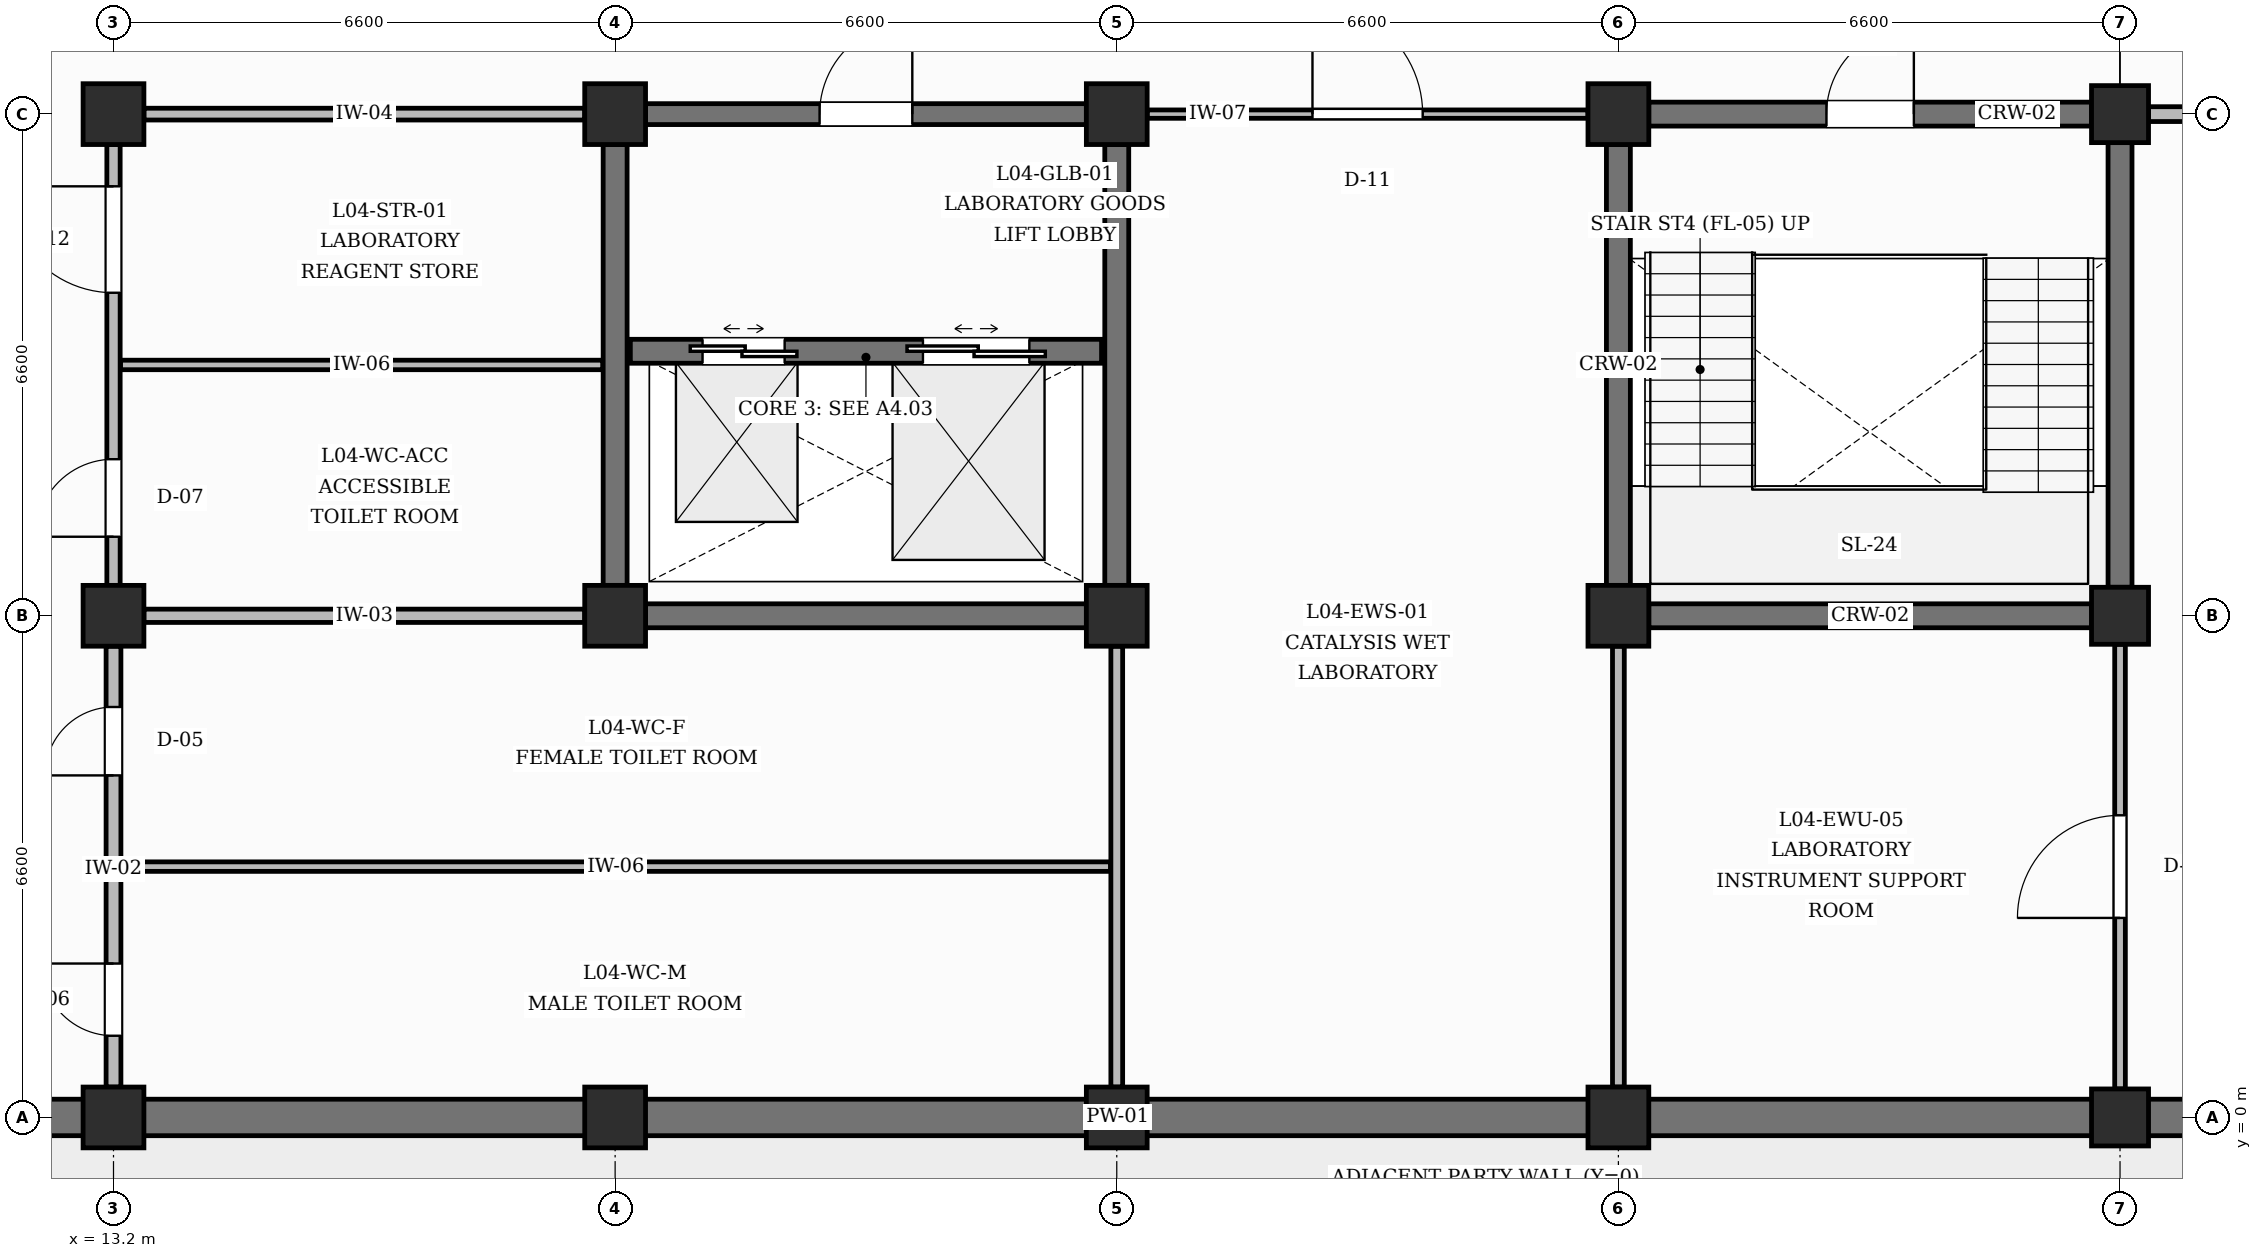
"""IFC4 building model, lengths in metres.
Left out: names, types, materials, properties, quantities, classifications, styles, units other than length and angle.
Written with IfcOpenShell. Run it as: python <this file> out.ifc"""

import sys

from ifc_helpers import new_model, si_unit, direction, frame, frame_2d, origin, origin_2d, place, context, subcontext, project, spatial, rectangle, extrude, element, fill, save


model = new_model("IFC4")
c1 = context("Model", 3, precision=1e-05, world=origin(), true_north=direction((0.0, 1.0)))
c2 = subcontext(c1, "Body", "Model", "MODEL_VIEW")
j1 = project(units=[si_unit("LENGTHUNIT", "METRE"), si_unit("PLANEANGLEUNIT", "RADIAN")], contexts=[c1])
p1 = place(None, origin())
s1 = spatial("IfcSite", under=j1, at=p1, CompositionType="ELEMENT")
p2 = place(p1, origin())
s2 = spatial("IfcBuilding", under=s1, at=p2, CompositionType="ELEMENT")
p3 = place(p2, frame((0.0, 0.0, 18.6)))
s3 = spatial("IfcBuildingStorey", under=s2, at=p3, CompositionType="ELEMENT", Elevation=18.6)
for number, where, z_axis, x_axis in (
    (1, (13.2, 0.0, 0.0), (0.0, 0.0, 1.0), (1.0, 0.0, 0.0)),
    (2, (13.2, 6.6, 0.0), (0.0, 0.0, 1.0), (1.0, 0.0, 0.0)),
    (3, (13.2, 13.2, 0.0), (0.0, 0.0, 1.0), (1.0, 0.0, 0.0)),
    (4, (19.8, 0.0, 0.0), (0.0, 0.0, 1.0), (1.0, 0.0, 0.0)),
    (5, (19.8, 6.6, 0.0), (0.0, 0.0, 1.0), (1.0, 0.0, 0.0)),
    (6, (19.8, 13.2, 0.0), (0.0, 0.0, 1.0), (1.0, 0.0, 0.0)),
    (7, (26.4, 0.0, 0.0), (0.0, 0.0, 1.0), (1.0, 0.0, 0.0)),
    (8, (26.4, 6.6, 0.0), (0.0, 0.0, 1.0), (1.0, 0.0, 0.0)),
    (9, (26.4, 13.2, 0.0), (0.0, 0.0, 1.0), (1.0, 0.0, 0.0)),
    (10, (33.0, 0.0, 0.0), (0.0, 0.0, 1.0), (1.0, 0.0, 0.0)),
    (11, (33.0, 6.6, 0.0), (0.0, 0.0, 1.0), (1.0, 0.0, 0.0)),
    (12, (33.0, 13.2, 0.0), (0.0, 0.0, 1.0), (1.0, 0.0, 0.0)),
):
    element("IfcColumn", number, at=place(p3, frame(where, z_axis=z_axis, x_axis=x_axis)), inside=s3, PredefinedType="COLUMN", context=c2, shape_type="SweptSolid", body=[
        extrude(rectangle(XDim=0.8, YDim=0.8, at=origin_2d()), origin(), (0.0, 0.0, 1.0), 4.2),
    ])
for number, where, z_axis, x_axis in (
    (13, (39.6, 0.0, 0.0), (0.0, 0.0, 1.0), (1.0, 0.0, 0.0)),
    (14, (39.6, 6.6, 0.0), (0.0, 0.0, 1.0), (1.0, 0.0, 0.0)),
    (15, (39.6, 13.2, 0.0), (0.0, 0.0, 1.0), (1.0, 0.0, 0.0)),
):
    element("IfcColumn", number, at=place(p3, frame(where, z_axis=z_axis, x_axis=x_axis)), inside=s3, PredefinedType="COLUMN", context=c2, shape_type="SweptSolid", body=[
        extrude(rectangle(XDim=0.75, YDim=0.75, at=origin_2d()), origin(), (0.0, 0.0, 1.0), 4.2),
    ])
p4 = place(p3, frame((7.0, 0.0, 0.0), z_axis=(0.0, 0.0, 1.0), x_axis=(1.0, 0.0, 0.0)))
e16 = element("IfcWall", 16, at=p4, inside=s3, PredefinedType="SOLIDWALL", context=c2, shape_type="SweptSolid", body=[
    extrude(rectangle(XDim=5.8, YDim=0.48, at=frame_2d((2.9, 0.0))), origin(), (0.0, 0.0, 1.0), 3.26),
])
p5 = place(p3, frame((13.6, 0.0, 0.0), z_axis=(0.0, 0.0, 1.0), x_axis=(1.0, 0.0, 0.0)))
e17 = element("IfcWall", 17, at=p5, inside=s3, PredefinedType="SOLIDWALL", context=c2, shape_type="SweptSolid", body=[
    extrude(rectangle(XDim=5.8, YDim=0.48, at=frame_2d((2.9, 0.0))), origin(), (0.0, 0.0, 1.0), 3.26),
])
for number, where, z_axis, x_axis in (
    (18, (20.2, 0.0, 0.0), (0.0, 0.0, 1.0), (1.0, 0.0, 0.0)),
    (19, (26.8, 0.0, 0.0), (0.0, 0.0, 1.0), (1.0, 0.0, 0.0)),
):
    element("IfcWall", number, at=place(p3, frame(where, z_axis=z_axis, x_axis=x_axis)), inside=s3, PredefinedType="SOLIDWALL", context=c2, shape_type="SweptSolid", body=[
        extrude(rectangle(XDim=5.8, YDim=0.48, at=frame_2d((2.9, 0.0))), origin(), (0.0, 0.0, 1.0), 3.26),
    ])
p6 = place(p3, frame((33.4, 0.0, 0.0), z_axis=(0.0, 0.0, 1.0), x_axis=(1.0, 0.0, 0.0)))
e20 = element("IfcWall", 20, at=p6, inside=s3, PredefinedType="SOLIDWALL", context=c2, shape_type="SweptSolid", body=[
    extrude(rectangle(XDim=5.825, YDim=0.48, at=frame_2d((2.913, 0.0))), origin(), (0.0, 0.0, 1.0), 3.26),
])
p7 = place(p3, frame((39.975, 0.0, 0.0), z_axis=(0.0, 0.0, 1.0), x_axis=(1.0, 0.0, 0.0)))
e21 = element("IfcWall", 21, at=p7, inside=s3, PredefinedType="SOLIDWALL", context=c2, shape_type="SweptSolid", body=[
    extrude(rectangle(XDim=5.85, YDim=0.48, at=frame_2d((2.925, 0.0))), origin(), (0.0, 0.0, 1.0), 3.26),
])
p8 = place(p3, frame((33.4, 6.6, 0.0), z_axis=(0.0, 0.0, 1.0), x_axis=(1.0, 0.0, 0.0)))
e22 = element("IfcWall", 22, at=p8, inside=s3, PredefinedType="SHEAR", context=c2, shape_type="SweptSolid", body=[
    extrude(rectangle(XDim=5.825, YDim=0.315, at=frame_2d((2.913, 0.0))), origin(), (0.0, 0.0, 1.0), 3.16),
])
p9 = place(p3, frame((33.4, 13.2, 0.0), z_axis=(0.0, 0.0, 1.0), x_axis=(1.0, 0.0, 0.0)))
e23 = element("IfcWall", 23, at=p9, inside=s3, PredefinedType="SHEAR", context=c2, shape_type="SweptSolid", body=[
    extrude(rectangle(XDim=5.825, YDim=0.315, at=frame_2d((2.913, 0.0))), origin(), (0.0, 0.0, 1.0), 3.16),
])
p10 = place(p9, frame((2.337, 0.0, 0.0)))
e24 = element("IfcOpeningElement", 24, at=p10, cuts=e23, PredefinedType="OPENING", context=c2, shape_type="SweptSolid", body=[
    extrude(rectangle(XDim=1.15, YDim=2.2, at=frame_2d((0.575, 1.1))), frame((0.0, 0.167, 0.0), z_axis=(0.0, -1.0, 0.0), x_axis=(1.0, 0.0, 0.0)), (0.0, 0.0, 1.0), 0.335),
])
p11 = place(p3, frame((33.0, 7.0, 0.0), z_axis=(0.0, 0.0, 1.0), x_axis=(0.0, 1.0, 0.0)))
e25 = element("IfcWall", 25, at=p11, inside=s3, PredefinedType="SHEAR", context=c2, shape_type="SweptSolid", body=[
    extrude(rectangle(XDim=5.8, YDim=0.315, at=frame_2d((2.9, 0.0))), origin(), (0.0, 0.0, 1.0), 3.16),
])
p12 = place(p3, frame((39.6, 6.975, 0.0), z_axis=(0.0, 0.0, 1.0), x_axis=(0.0, 1.0, 0.0)))
e26 = element("IfcWall", 26, at=p12, inside=s3, PredefinedType="SHEAR", context=c2, shape_type="SweptSolid", body=[
    extrude(rectangle(XDim=5.85, YDim=0.315, at=frame_2d((2.925, 0.0))), origin(), (0.0, 0.0, 1.0), 3.16),
])
for number, where, z_axis, x_axis in (
    (27, (20.2, 6.6, 0.0), (0.0, 0.0, 1.0), (1.0, 0.0, 0.0)),
    (28, (19.8, 7.0, 0.0), (0.0, 0.0, 1.0), (0.0, 1.0, 0.0)),
    (29, (26.4, 7.0, 0.0), (0.0, 0.0, 1.0), (0.0, 1.0, 0.0)),
):
    element("IfcWall", number, at=place(p3, frame(where, z_axis=z_axis, x_axis=x_axis)), inside=s3, PredefinedType="SHEAR", context=c2, shape_type="SweptSolid", body=[
        extrude(rectangle(XDim=5.8, YDim=0.315, at=frame_2d((2.9, 0.0))), origin(), (0.0, 0.0, 1.0), 3.16),
    ])
p13 = place(p3, frame((20.2, 13.2, 0.0), z_axis=(0.0, 0.0, 1.0), x_axis=(1.0, 0.0, 0.0)))
e30 = element("IfcWall", 30, at=p13, inside=s3, PredefinedType="SHEAR", context=c2, shape_type="SweptSolid", body=[
    extrude(rectangle(XDim=5.8, YDim=0.275, at=frame_2d((2.9, 0.0))), origin(), (0.0, 0.0, 1.0), 3.16),
])
p14 = place(p13, frame((2.29, 0.0, 0.0)))
e31 = element("IfcOpeningElement", 31, at=p14, cuts=e30, PredefinedType="OPENING", context=c2, shape_type="SweptSolid", body=[
    extrude(rectangle(XDim=1.22, YDim=2.15, at=frame_2d((0.61, 1.075))), frame((0.0, 0.147, 0.0), z_axis=(0.0, -1.0, 0.0), x_axis=(1.0, 0.0, 0.0)), (0.0, 0.0, 1.0), 0.295),
])
p15 = place(p3, frame((20.0, 10.08, 0.0), z_axis=(0.0, 0.0, 1.0), x_axis=(1.0, 0.0, 0.0)))
e32 = element("IfcWall", 32, at=p15, inside=s3, PredefinedType="SHEAR", context=c2, shape_type="SweptSolid", body=[
    extrude(rectangle(XDim=6.2, YDim=0.315, at=frame_2d((3.1, 0.0))), origin(), (0.0, 0.0, 1.0), 3.86),
])
p16 = place(p15, frame((0.95, 0.0, 0.0)))
e33 = element("IfcOpeningElement", 33, at=p16, cuts=e32, PredefinedType="OPENING", context=c2, shape_type="SweptSolid", body=[
    extrude(rectangle(XDim=1.08, YDim=2.15, at=frame_2d((0.54, 1.075))), frame((0.0, 0.167, 0.0), z_axis=(0.0, -1.0, 0.0), x_axis=(1.0, 0.0, 0.0)), (0.0, 0.0, 1.0), 0.335),
])
p17 = place(p15, frame((3.85, 0.0, 0.0)))
e34 = element("IfcOpeningElement", 34, at=p17, cuts=e32, PredefinedType="OPENING", context=c2, shape_type="SweptSolid", body=[
    extrude(rectangle(XDim=1.4, YDim=2.35, at=frame_2d((0.7, 1.175))), frame((0.0, 0.167, 0.0), z_axis=(0.0, -1.0, 0.0), x_axis=(1.0, 0.0, 0.0)), (0.0, 0.0, 1.0), 0.335),
])
p18 = place(p3, frame((13.2, 0.4, 0.0), z_axis=(0.0, 0.0, 1.0), x_axis=(0.0, 1.0, 0.0)))
e35 = element("IfcWall", 35, at=p18, inside=s3, PredefinedType="PARTITIONING", context=c2, shape_type="SweptSolid", body=[
    extrude(rectangle(XDim=5.8, YDim=0.195, at=frame_2d((2.9, 0.0))), origin(), (0.0, 0.0, 1.0), 3.16),
])
p19 = place(p18, frame((0.675, 0.0, 0.0)))
e36 = element("IfcOpeningElement", 36, at=p19, cuts=e35, PredefinedType="OPENING", context=c2, shape_type="SweptSolid", body=[
    extrude(rectangle(XDim=0.95, YDim=2.1, at=frame_2d((0.475, 1.05))), frame((0.0, 0.107, 0.0), z_axis=(0.0, -1.0, 0.0), x_axis=(1.0, 0.0, 0.0)), (0.0, 0.0, 1.0), 0.215),
])
p20 = place(p18, frame((4.1, 0.0, 0.0)))
e37 = element("IfcOpeningElement", 37, at=p20, cuts=e35, PredefinedType="OPENING", context=c2, shape_type="SweptSolid", body=[
    extrude(rectangle(XDim=0.9, YDim=2.1, at=frame_2d((0.45, 1.05))), frame((0.0, 0.107, 0.0), z_axis=(0.0, -1.0, 0.0), x_axis=(1.0, 0.0, 0.0)), (0.0, 0.0, 1.0), 0.215),
])
p21 = place(p3, frame((26.4, 0.4, 0.0), z_axis=(0.0, 0.0, 1.0), x_axis=(0.0, 1.0, 0.0)))
e38 = element("IfcWall", 38, at=p21, inside=s3, PredefinedType="PARTITIONING", context=c2, shape_type="SweptSolid", body=[
    extrude(rectangle(XDim=5.8, YDim=0.155, at=frame_2d((2.9, 0.0))), origin(), (0.0, 0.0, 1.0), 3.16),
])
p22 = place(p3, frame((13.6, 6.6, 0.0), z_axis=(0.0, 0.0, 1.0), x_axis=(1.0, 0.0, 0.0)))
e39 = element("IfcWall", 39, at=p22, inside=s3, PredefinedType="PARTITIONING", context=c2, shape_type="SweptSolid", body=[
    extrude(rectangle(XDim=5.8, YDim=0.175, at=frame_2d((2.9, 0.0))), origin(), (0.0, 0.0, 1.0), 3.16),
])
p23 = place(p3, frame((13.2, 7.0, 0.0), z_axis=(0.0, 0.0, 1.0), x_axis=(0.0, 1.0, 0.0)))
e40 = element("IfcWall", 40, at=p23, inside=s3, PredefinedType="PARTITIONING", context=c2, shape_type="SweptSolid", body=[
    extrude(rectangle(XDim=5.8, YDim=0.175, at=frame_2d((2.9, 0.0))), origin(), (0.0, 0.0, 1.0), 3.16),
])
p24 = place(p23, frame((0.64, 0.0, 0.0)))
e41 = element("IfcOpeningElement", 41, at=p24, cuts=e40, PredefinedType="OPENING", context=c2, shape_type="SweptSolid", body=[
    extrude(rectangle(XDim=1.02, YDim=2.15, at=frame_2d((0.51, 1.075))), frame((0.0, 0.097, 0.0), z_axis=(0.0, -1.0, 0.0), x_axis=(1.0, 0.0, 0.0)), (0.0, 0.0, 1.0), 0.195),
])
p25 = place(p23, frame((3.85, 0.0, 0.0)))
e42 = element("IfcOpeningElement", 42, at=p25, cuts=e40, PredefinedType="OPENING", context=c2, shape_type="SweptSolid", body=[
    extrude(rectangle(XDim=1.4, YDim=2.25, at=frame_2d((0.7, 1.125))), frame((0.0, 0.097, 0.0), z_axis=(0.0, -1.0, 0.0), x_axis=(1.0, 0.0, 0.0)), (0.0, 0.0, 1.0), 0.195),
])
p26 = place(p3, frame((13.6, 13.2, 0.0), z_axis=(0.0, 0.0, 1.0), x_axis=(1.0, 0.0, 0.0)))
e43 = element("IfcWall", 43, at=p26, inside=s3, PredefinedType="PARTITIONING", context=c2, shape_type="SweptSolid", body=[
    extrude(rectangle(XDim=5.8, YDim=0.155, at=frame_2d((2.9, 0.0))), origin(), (0.0, 0.0, 1.0), 3.16),
])
p27 = place(p3, frame((33.0, 0.4, 0.0), z_axis=(0.0, 0.0, 1.0), x_axis=(0.0, 1.0, 0.0)))
e44 = element("IfcWall", 44, at=p27, inside=s3, PredefinedType="PARTITIONING", context=c2, shape_type="SweptSolid", body=[
    extrude(rectangle(XDim=5.8, YDim=0.155, at=frame_2d((2.9, 0.0))), origin(), (0.0, 0.0, 1.0), 3.16),
])
p28 = place(p3, frame((26.8, 13.2, 0.0), z_axis=(0.0, 0.0, 1.0), x_axis=(1.0, 0.0, 0.0)))
e45 = element("IfcWall", 45, at=p28, inside=s3, PredefinedType="PARTITIONING", context=c2, shape_type="SweptSolid", body=[
    extrude(rectangle(XDim=5.8, YDim=0.11, at=frame_2d((2.9, 0.0))), origin(), (0.0, 0.0, 1.0), 3.16),
])
p29 = place(p28, frame((2.175, 0.0, 0.0)))
e46 = element("IfcOpeningElement", 46, at=p29, cuts=e45, PredefinedType="OPENING", context=c2, shape_type="SweptSolid", body=[
    extrude(rectangle(XDim=1.45, YDim=2.25, at=frame_2d((0.725, 1.125))), frame((0.0, 0.065, 0.0), z_axis=(0.0, -1.0, 0.0), x_axis=(1.0, 0.0, 0.0)), (0.0, 0.0, 1.0), 0.13),
])
p30 = place(p3, frame((39.6, 0.375, 0.0), z_axis=(0.0, 0.0, 1.0), x_axis=(0.0, 1.0, 0.0)))
e47 = element("IfcWall", 47, at=p30, inside=s3, PredefinedType="PARTITIONING", context=c2, shape_type="SweptSolid", body=[
    extrude(rectangle(XDim=5.85, YDim=0.14, at=frame_2d((2.925, 0.0))), origin(), (0.0, 0.0, 1.0), 3.16),
])
p31 = place(p30, frame((2.25, 0.0, 0.0)))
e48 = element("IfcOpeningElement", 48, at=p31, cuts=e47, PredefinedType="OPENING", context=c2, shape_type="SweptSolid", body=[
    extrude(rectangle(XDim=1.35, YDim=2.3, at=frame_2d((0.675, 1.15))), frame((0.0, 0.08, 0.0), z_axis=(0.0, -1.0, 0.0), x_axis=(1.0, 0.0, 0.0)), (0.0, 0.0, 1.0), 0.16),
])
p32 = place(p3, frame((39.975, 13.2, 0.0), z_axis=(0.0, 0.0, 1.0), x_axis=(1.0, 0.0, 0.0)))
e49 = element("IfcWall", 49, at=p32, inside=s3, PredefinedType="PARTITIONING", context=c2, shape_type="SweptSolid", body=[
    extrude(rectangle(XDim=5.85, YDim=0.195, at=frame_2d((2.925, 0.0))), origin(), (0.0, 0.0, 1.0), 3.16),
])
p33 = place(p32, frame((2.225, 0.0, 0.0)))
e50 = element("IfcOpeningElement", 50, at=p33, cuts=e49, PredefinedType="OPENING", context=c2, shape_type="SweptSolid", body=[
    extrude(rectangle(XDim=1.4, YDim=2.25, at=frame_2d((0.7, 1.125))), frame((0.0, 0.107, 0.0), z_axis=(0.0, -1.0, 0.0), x_axis=(1.0, 0.0, 0.0)), (0.0, 0.0, 1.0), 0.215),
])
p34 = place(p3, frame((13.302, 3.3, 0.0), z_axis=(0.0, 0.0, 1.0), x_axis=(1.0, 0.0, 0.0)))
e51 = element("IfcWall", 51, at=p34, inside=s3, PredefinedType="PARTITIONING", context=c2, shape_type="SweptSolid", body=[
    extrude(rectangle(XDim=13.015, YDim=0.125, at=frame_2d((6.507, 0.0))), origin(), (0.0, 0.0, 1.0), 3.86),
])
p35 = place(p3, frame((13.292, 9.9, 0.0), z_axis=(0.0, 0.0, 1.0), x_axis=(1.0, 0.0, 0.0)))
e52 = element("IfcWall", 52, at=p35, inside=s3, PredefinedType="PARTITIONING", context=c2, shape_type="SweptSolid", body=[
    extrude(rectangle(XDim=6.345, YDim=0.125, at=frame_2d((3.172, 0.0))), origin(), (0.0, 0.0, 1.0), 3.86),
])
p36 = place(p10, origin())
e53 = element("IfcDoor", 53, at=p36, inside=s3, OperationType="SINGLE_SWING_RIGHT", PredefinedType="DOOR", context=c2, shape_type="SweptSolid", body=[
    extrude(rectangle(XDim=1.15, YDim=2.2, at=frame_2d((0.575, 1.1))), frame((0.0, 0.025, 0.0), z_axis=(0.0, -1.0, 0.0), x_axis=(1.0, 0.0, 0.0)), (0.0, 0.0, 1.0), 0.05),
])
fill(e24, e53)
p37 = place(p16, origin())
e54 = element("IfcDoor", 54, at=p37, inside=s3, OperationType="DOUBLE_DOOR_SLIDING", PredefinedType="USERDEFINED", context=c2, shape_type="SweptSolid", body=[
    extrude(rectangle(XDim=1.08, YDim=2.15, at=frame_2d((0.54, 1.075))), frame((0.0, 0.025, 0.0), z_axis=(0.0, -1.0, 0.0), x_axis=(1.0, 0.0, 0.0)), (0.0, 0.0, 1.0), 0.05),
])
fill(e33, e54)
p38 = place(p17, origin())
e55 = element("IfcDoor", 55, at=p38, inside=s3, OperationType="DOUBLE_DOOR_SLIDING", PredefinedType="USERDEFINED", context=c2, shape_type="SweptSolid", body=[
    extrude(rectangle(XDim=1.4, YDim=2.35, at=frame_2d((0.7, 1.175))), frame((0.0, 0.025, 0.0), z_axis=(0.0, -1.0, 0.0), x_axis=(1.0, 0.0, 0.0)), (0.0, 0.0, 1.0), 0.05),
])
fill(e34, e55)
p39 = place(p14, origin())
e56 = element("IfcDoor", 56, at=p39, inside=s3, OperationType="SINGLE_SWING_RIGHT", PredefinedType="DOOR", context=c2, shape_type="SweptSolid", body=[
    extrude(rectangle(XDim=1.22, YDim=2.15, at=frame_2d((0.61, 1.075))), frame((0.0, 0.025, 0.0), z_axis=(0.0, -1.0, 0.0), x_axis=(1.0, 0.0, 0.0)), (0.0, 0.0, 1.0), 0.05),
])
fill(e31, e56)
p40 = place(p19, origin())
e57 = element("IfcDoor", 57, at=p40, inside=s3, OperationType="SINGLE_SWING_RIGHT", PredefinedType="DOOR", context=c2, shape_type="SweptSolid", body=[
    extrude(rectangle(XDim=0.95, YDim=2.1, at=frame_2d((0.475, 1.05))), frame((0.0, 0.025, 0.0), z_axis=(0.0, -1.0, 0.0), x_axis=(1.0, 0.0, 0.0)), (0.0, 0.0, 1.0), 0.05),
])
fill(e36, e57)
p41 = place(p20, origin())
e58 = element("IfcDoor", 58, at=p41, inside=s3, OperationType="SINGLE_SWING_LEFT", PredefinedType="DOOR", context=c2, shape_type="SweptSolid", body=[
    extrude(rectangle(XDim=0.9, YDim=2.1, at=frame_2d((0.45, 1.05))), frame((0.0, 0.025, 0.0), z_axis=(0.0, -1.0, 0.0), x_axis=(1.0, 0.0, 0.0)), (0.0, 0.0, 1.0), 0.05),
])
fill(e37, e58)
p42 = place(p24, origin())
e59 = element("IfcDoor", 59, at=p42, inside=s3, OperationType="SINGLE_SWING_LEFT", PredefinedType="DOOR", context=c2, shape_type="SweptSolid", body=[
    extrude(rectangle(XDim=1.02, YDim=2.15, at=frame_2d((0.51, 1.075))), frame((0.0, 0.025, 0.0), z_axis=(0.0, -1.0, 0.0), x_axis=(1.0, 0.0, 0.0)), (0.0, 0.0, 1.0), 0.05),
])
fill(e41, e59)
p43 = place(p25, origin())
e60 = element("IfcDoor", 60, at=p43, inside=s3, OperationType="SINGLE_SWING_RIGHT", PredefinedType="DOOR", context=c2, shape_type="SweptSolid", body=[
    extrude(rectangle(XDim=1.4, YDim=2.25, at=frame_2d((0.7, 1.125))), frame((0.0, 0.025, 0.0), z_axis=(0.0, -1.0, 0.0), x_axis=(1.0, 0.0, 0.0)), (0.0, 0.0, 1.0), 0.05),
])
fill(e42, e60)
p44 = place(p29, origin())
e61 = element("IfcDoor", 61, at=p44, inside=s3, OperationType="SINGLE_SWING_LEFT", PredefinedType="DOOR", context=c2, shape_type="SweptSolid", body=[
    extrude(rectangle(XDim=1.45, YDim=2.25, at=frame_2d((0.725, 1.125))), frame((0.0, 0.025, 0.0), z_axis=(0.0, -1.0, 0.0), x_axis=(1.0, 0.0, 0.0)), (0.0, 0.0, 1.0), 0.05),
])
fill(e46, e61)
p45 = place(p31, origin())
e62 = element("IfcDoor", 62, at=p45, inside=s3, OperationType="SINGLE_SWING_LEFT", PredefinedType="DOOR", context=c2, shape_type="SweptSolid", body=[
    extrude(rectangle(XDim=1.35, YDim=2.3, at=frame_2d((0.675, 1.15))), frame((0.0, 0.025, 0.0), z_axis=(0.0, -1.0, 0.0), x_axis=(1.0, 0.0, 0.0)), (0.0, 0.0, 1.0), 0.05),
])
fill(e48, e62)
save(model, sys.argv[1])
